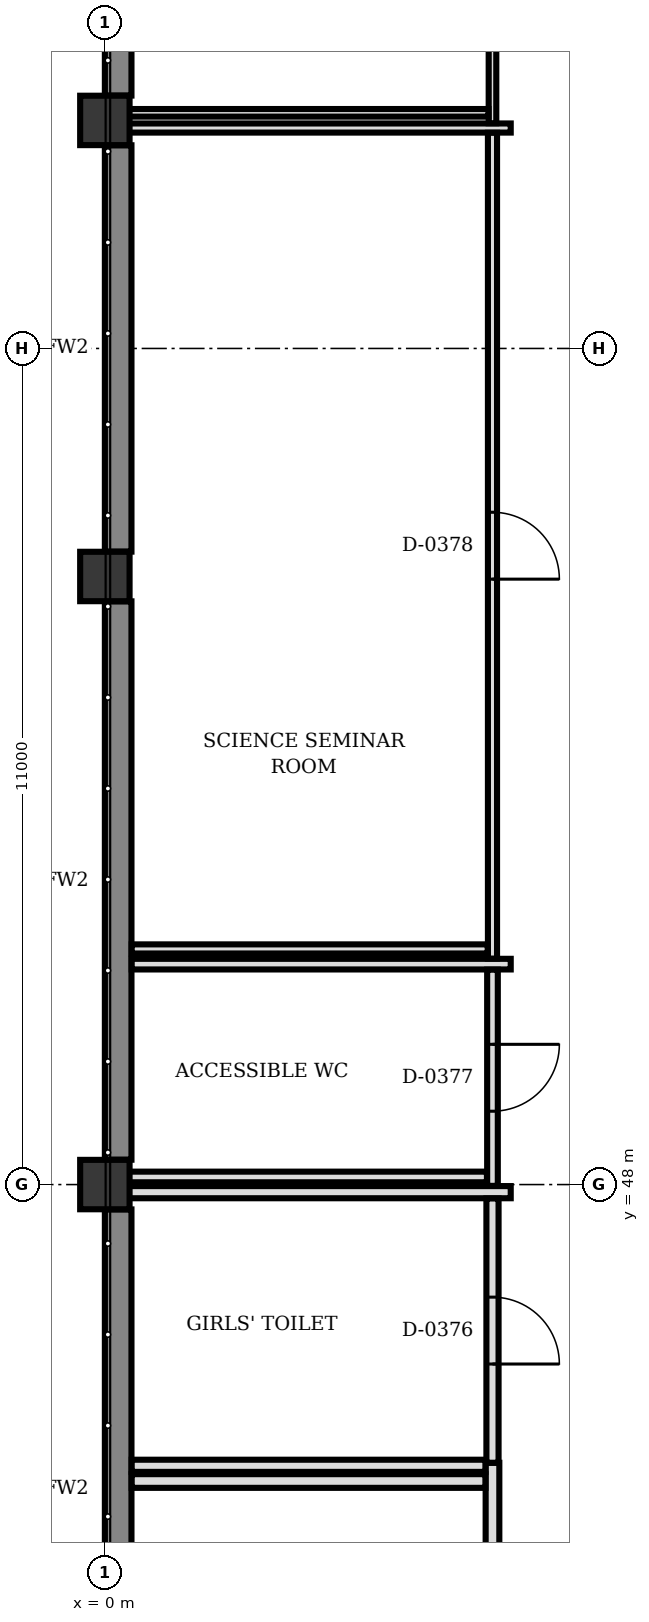
"""IFC4 building model, lengths in metres.
Left out: names, types, materials, properties, quantities, classifications, styles, units other than length and angle.
Written with IfcOpenShell. Run it as: python <this file> out.ifc"""

import sys

from ifc_helpers import new_model, si_unit, direction, frame, frame_2d, origin, origin_2d, place, context, subcontext, project, spatial, rectangle, extrude, element, fill, save


model = new_model("IFC4")
c1 = context("Model", 3, precision=1e-05, world=origin(), true_north=direction((0.0, 1.0)))
c2 = subcontext(c1, "Body", "Model", "MODEL_VIEW")
j1 = project(units=[si_unit("LENGTHUNIT", "METRE"), si_unit("PLANEANGLEUNIT", "RADIAN")], contexts=[c1])
p1 = place(None, origin())
s1 = spatial("IfcSite", under=j1, at=p1, CompositionType="ELEMENT")
p2 = place(p1, origin())
s2 = spatial("IfcBuilding", under=s1, at=p2, CompositionType="ELEMENT")
p3 = place(p2, frame((0.0, 0.0, 8.5)))
s3 = spatial("IfcBuildingStorey", under=s2, at=p3, CompositionType="ELEMENT", Elevation=8.5)
for number, where, z_axis, x_axis in (
    (1, (0.0, 48.0, 0.0), (0.0, 0.0, 1.0), (1.0, 0.0, 0.0)),
    (2, (0.0, 56.0, 0.0), (0.0, 0.0, 1.0), (1.0, 0.0, 0.0)),
    (3, (0.0, 62.0, 0.0), (0.0, 0.0, 1.0), (1.0, 0.0, 0.0)),
):
    element("IfcColumn", number, at=place(p3, frame(where, z_axis=z_axis, x_axis=x_axis)), inside=s3, PredefinedType="COLUMN", context=c2, shape_type="SweptSolid", body=[
        extrude(rectangle(XDim=0.65, YDim=0.65, at=origin_2d()), origin(), (0.0, 0.0, 1.0), 4.0),
    ])
for number, where, z_axis, x_axis in (
    (4, (0.175, 40.327, 0.0), (0.0, 0.0, 1.0), (0.0, 1.0, 0.0)),
    (5, (0.175, 48.327, 0.0), (0.0, 0.0, 1.0), (0.0, 1.0, 0.0)),
):
    element("IfcWall", number, at=place(p3, frame(where, z_axis=z_axis, x_axis=x_axis)), inside=s3, PredefinedType="SHEAR", context=c2, shape_type="SweptSolid", body=[
        extrude(rectangle(XDim=7.346, YDim=0.35, at=frame_2d((3.673, 0.0))), origin(), (0.0, 0.0, 1.0), 3.002),
    ])
for number, where, z_axis, x_axis in (
    (6, (0.175, 56.327, 0.0), (0.0, 0.0, 1.0), (0.0, 1.0, 0.0)),
    (7, (0.175, 62.327, 0.0), (0.0, 0.0, 1.0), (0.0, 1.0, 0.0)),
):
    element("IfcWall", number, at=place(p3, frame(where, z_axis=z_axis, x_axis=x_axis)), inside=s3, PredefinedType="SHEAR", context=c2, shape_type="SweptSolid", body=[
        extrude(rectangle(XDim=5.346, YDim=0.35, at=frame_2d((2.673, 0.0))), origin(), (0.0, 0.0, 1.0), 3.002),
    ])
p4 = place(p3, frame((5.1, 44.34, 0.0), z_axis=(0.0, 0.0, 1.0), x_axis=(0.0, -1.0, 0.0)))
e8 = element("IfcWall", 8, at=p4, inside=s3, PredefinedType="PARTITIONING", context=c2, shape_type="SweptSolid", body=[
    extrude(rectangle(XDim=4.207, YDim=0.18, at=frame_2d((2.104, 0.0))), origin(), (0.0, 0.0, 1.0), 3.7),
])
p5 = place(p4, frame((1.429, 0.0, 0.0)))
e9 = element("IfcOpeningElement", 9, at=p5, cuts=e8, PredefinedType="OPENING", context=c2, shape_type="SweptSolid", body=[
    extrude(rectangle(XDim=1.35, YDim=2.2, at=frame_2d((0.675, 1.1))), frame((0.0, 0.1, 0.0), z_axis=(0.0, -1.0, 0.0), x_axis=(1.0, 0.0, 0.0)), (0.0, 0.0, 1.0), 0.2),
])
p6 = place(p3, frame((0.353, 44.1, 0.0), z_axis=(0.0, 0.0, 1.0), x_axis=(1.0, 0.0, 0.0)))
e10 = element("IfcWall", 10, at=p6, inside=s3, PredefinedType="PARTITIONING", context=c2, shape_type="SweptSolid", body=[
    extrude(rectangle(XDim=4.654, YDim=0.18, at=frame_2d((2.327, 0.0))), origin(), (0.0, 0.0, 1.0), 3.7),
])
p7 = place(p3, frame((0.317, 47.9, 0.0), z_axis=(0.0, 0.0, 1.0), x_axis=(1.0, 0.0, 0.0)))
e11 = element("IfcWall", 11, at=p7, inside=s3, PredefinedType="PARTITIONING", context=c2, shape_type="SweptSolid", body=[
    extrude(rectangle(XDim=5.023, YDim=0.16, at=frame_2d((2.512, 0.0))), origin(), (0.0, 0.0, 1.0), 3.002),
])
p8 = place(p3, frame((5.1, 47.817, 0.0), z_axis=(0.0, 0.0, 1.0), x_axis=(0.0, -1.0, 0.0)))
e12 = element("IfcWall", 12, at=p8, inside=s3, PredefinedType="PARTITIONING", context=c2, shape_type="SweptSolid", body=[
    extrude(rectangle(XDim=3.477, YDim=0.16, at=frame_2d((1.738, 0.0))), origin(), (0.0, 0.0, 1.0), 3.002),
])
p9 = place(p8, frame((1.298, 0.0, 0.0)))
e13 = element("IfcOpeningElement", 13, at=p9, cuts=e12, PredefinedType="OPENING", context=c2, shape_type="SweptSolid", body=[
    extrude(rectangle(XDim=0.88, YDim=2.1, at=frame_2d((0.44, 1.05))), frame((0.0, 0.09, 0.0), z_axis=(0.0, -1.0, 0.0), x_axis=(1.0, 0.0, 0.0)), (0.0, 0.0, 1.0), 0.18),
])
p10 = place(p3, frame((5.007, 44.3, 0.0), z_axis=(0.0, 0.0, 1.0), x_axis=(-1.0, 0.0, 0.0)))
e14 = element("IfcWall", 14, at=p10, inside=s3, PredefinedType="PARTITIONING", context=c2, shape_type="SweptSolid", body=[
    extrude(rectangle(XDim=4.654, YDim=0.16, at=frame_2d((2.327, 0.0))), origin(), (0.0, 0.0, 1.0), 3.7),
])
p11 = place(p3, frame((0.353, 50.9, 0.0), z_axis=(0.0, 0.0, 1.0), x_axis=(1.0, 0.0, 0.0)))
e15 = element("IfcWall", 15, at=p11, inside=s3, PredefinedType="PARTITIONING", context=c2, shape_type="SweptSolid", body=[
    extrude(rectangle(XDim=4.987, YDim=0.14, at=frame_2d((2.494, 0.0))), origin(), (0.0, 0.0, 1.0), 3.7),
])
p12 = place(p3, frame((5.1, 50.827, 0.0), z_axis=(0.0, 0.0, 1.0), x_axis=(0.0, -1.0, 0.0)))
e16 = element("IfcWall", 16, at=p12, inside=s3, PredefinedType="PARTITIONING", context=c2, shape_type="SweptSolid", body=[
    extrude(rectangle(XDim=2.844, YDim=0.14, at=frame_2d((1.422, 0.0))), origin(), (0.0, 0.0, 1.0), 3.002),
])
p13 = place(p12, frame((0.982, 0.0, 0.0)))
e17 = element("IfcOpeningElement", 17, at=p13, cuts=e16, PredefinedType="OPENING", context=c2, shape_type="SweptSolid", body=[
    extrude(rectangle(XDim=0.88, YDim=2.1, at=frame_2d((0.44, 1.05))), frame((0.0, 0.08, 0.0), z_axis=(0.0, -1.0, 0.0), x_axis=(1.0, 0.0, 0.0)), (0.0, 0.0, 1.0), 0.16),
])
p14 = place(p3, frame((5.027, 48.1, 0.0), z_axis=(0.0, 0.0, 1.0), x_axis=(-1.0, 0.0, 0.0)))
e18 = element("IfcWall", 18, at=p14, inside=s3, PredefinedType="PARTITIONING", context=c2, shape_type="SweptSolid", body=[
    extrude(rectangle(XDim=4.71, YDim=0.14, at=frame_2d((2.355, 0.0))), origin(), (0.0, 0.0, 1.0), 3.002),
])
p15 = place(p3, frame((0.317, 61.9, 0.0), z_axis=(0.0, 0.0, 1.0), x_axis=(1.0, 0.0, 0.0)))
e19 = element("IfcWall", 19, at=p15, inside=s3, PredefinedType="PARTITIONING", context=c2, shape_type="SweptSolid", body=[
    extrude(rectangle(XDim=5.023, YDim=0.12, at=frame_2d((2.512, 0.0))), origin(), (0.0, 0.0, 1.0), 3.002),
])
p16 = place(p3, frame((5.1, 61.837, 0.0), z_axis=(0.0, 0.0, 1.0), x_axis=(0.0, -1.0, 0.0)))
e20 = element("IfcWall", 20, at=p16, inside=s3, PredefinedType="PARTITIONING", context=c2, shape_type="SweptSolid", body=[
    extrude(rectangle(XDim=10.864, YDim=0.12, at=frame_2d((5.432, 0.0))), origin(), (0.0, 0.0, 1.0), 3.002),
])
p17 = place(p16, frame((4.992, 0.0, 0.0)))
e21 = element("IfcOpeningElement", 21, at=p17, cuts=e20, PredefinedType="OPENING", context=c2, shape_type="SweptSolid", body=[
    extrude(rectangle(XDim=0.88, YDim=2.1, at=frame_2d((0.44, 1.05))), frame((0.0, 0.07, 0.0), z_axis=(0.0, -1.0, 0.0), x_axis=(1.0, 0.0, 0.0)), (0.0, 0.0, 1.0), 0.14),
])
p18 = place(p3, frame((5.037, 51.1, 0.0), z_axis=(0.0, 0.0, 1.0), x_axis=(-1.0, 0.0, 0.0)))
e22 = element("IfcWall", 22, at=p18, inside=s3, PredefinedType="PARTITIONING", context=c2, shape_type="SweptSolid", body=[
    extrude(rectangle(XDim=4.684, YDim=0.12, at=frame_2d((2.342, 0.0))), origin(), (0.0, 0.0, 1.0), 3.7),
])
p19 = place(p3, frame((5.1, 75.867, 0.0), z_axis=(0.0, 0.0, 1.0), x_axis=(0.0, -1.0, 0.0)))
e23 = element("IfcWall", 23, at=p19, inside=s3, PredefinedType="PARTITIONING", context=c2, shape_type="SweptSolid", body=[
    extrude(rectangle(XDim=13.904, YDim=0.1, at=frame_2d((6.952, 0.0))), origin(), (0.0, 0.0, 1.0), 3.002),
])
p20 = place(p19, frame((6.402, 0.0, 0.0)))
e24 = element("IfcOpeningElement", 24, at=p20, cuts=e23, PredefinedType="OPENING", context=c2, shape_type="SweptSolid", body=[
    extrude(rectangle(XDim=1.1, YDim=2.28, at=frame_2d((0.55, 1.14))), frame((0.0, 0.06, 0.0), z_axis=(0.0, -1.0, 0.0), x_axis=(1.0, 0.0, 0.0)), (0.0, 0.0, 1.0), 0.12),
])
p21 = place(p3, frame((5.047, 62.1, 0.0), z_axis=(0.0, 0.0, 1.0), x_axis=(-1.0, 0.0, 0.0)))
e25 = element("IfcWall", 25, at=p21, inside=s3, PredefinedType="PARTITIONING", context=c2, shape_type="SweptSolid", body=[
    extrude(rectangle(XDim=4.73, YDim=0.1, at=frame_2d((2.365, 0.0))), origin(), (0.0, 0.0, 1.0), 3.002),
])
p22 = place(p9, origin())
e26 = element("IfcDoor", 26, at=p22, inside=s3, OperationType="SINGLE_SWING_RIGHT", PredefinedType="DOOR", context=c2, shape_type="SweptSolid", body=[
    extrude(rectangle(XDim=0.88, YDim=2.1, at=frame_2d((0.44, 1.05))), frame((0.0, 0.025, 0.0), z_axis=(0.0, -1.0, 0.0), x_axis=(1.0, 0.0, 0.0)), (0.0, 0.0, 1.0), 0.05),
])
fill(e13, e26)
p23 = place(p13, origin())
e27 = element("IfcDoor", 27, at=p23, inside=s3, OperationType="SINGLE_SWING_LEFT", PredefinedType="DOOR", context=c2, shape_type="SweptSolid", body=[
    extrude(rectangle(XDim=0.88, YDim=2.1, at=frame_2d((0.44, 1.05))), frame((0.0, 0.025, 0.0), z_axis=(0.0, -1.0, 0.0), x_axis=(1.0, 0.0, 0.0)), (0.0, 0.0, 1.0), 0.05),
])
fill(e17, e27)
p24 = place(p17, origin())
e28 = element("IfcDoor", 28, at=p24, inside=s3, OperationType="SINGLE_SWING_RIGHT", PredefinedType="DOOR", context=c2, shape_type="SweptSolid", body=[
    extrude(rectangle(XDim=0.88, YDim=2.1, at=frame_2d((0.44, 1.05))), frame((0.0, 0.025, 0.0), z_axis=(0.0, -1.0, 0.0), x_axis=(1.0, 0.0, 0.0)), (0.0, 0.0, 1.0), 0.05),
])
fill(e21, e28)
save(model, sys.argv[1])
